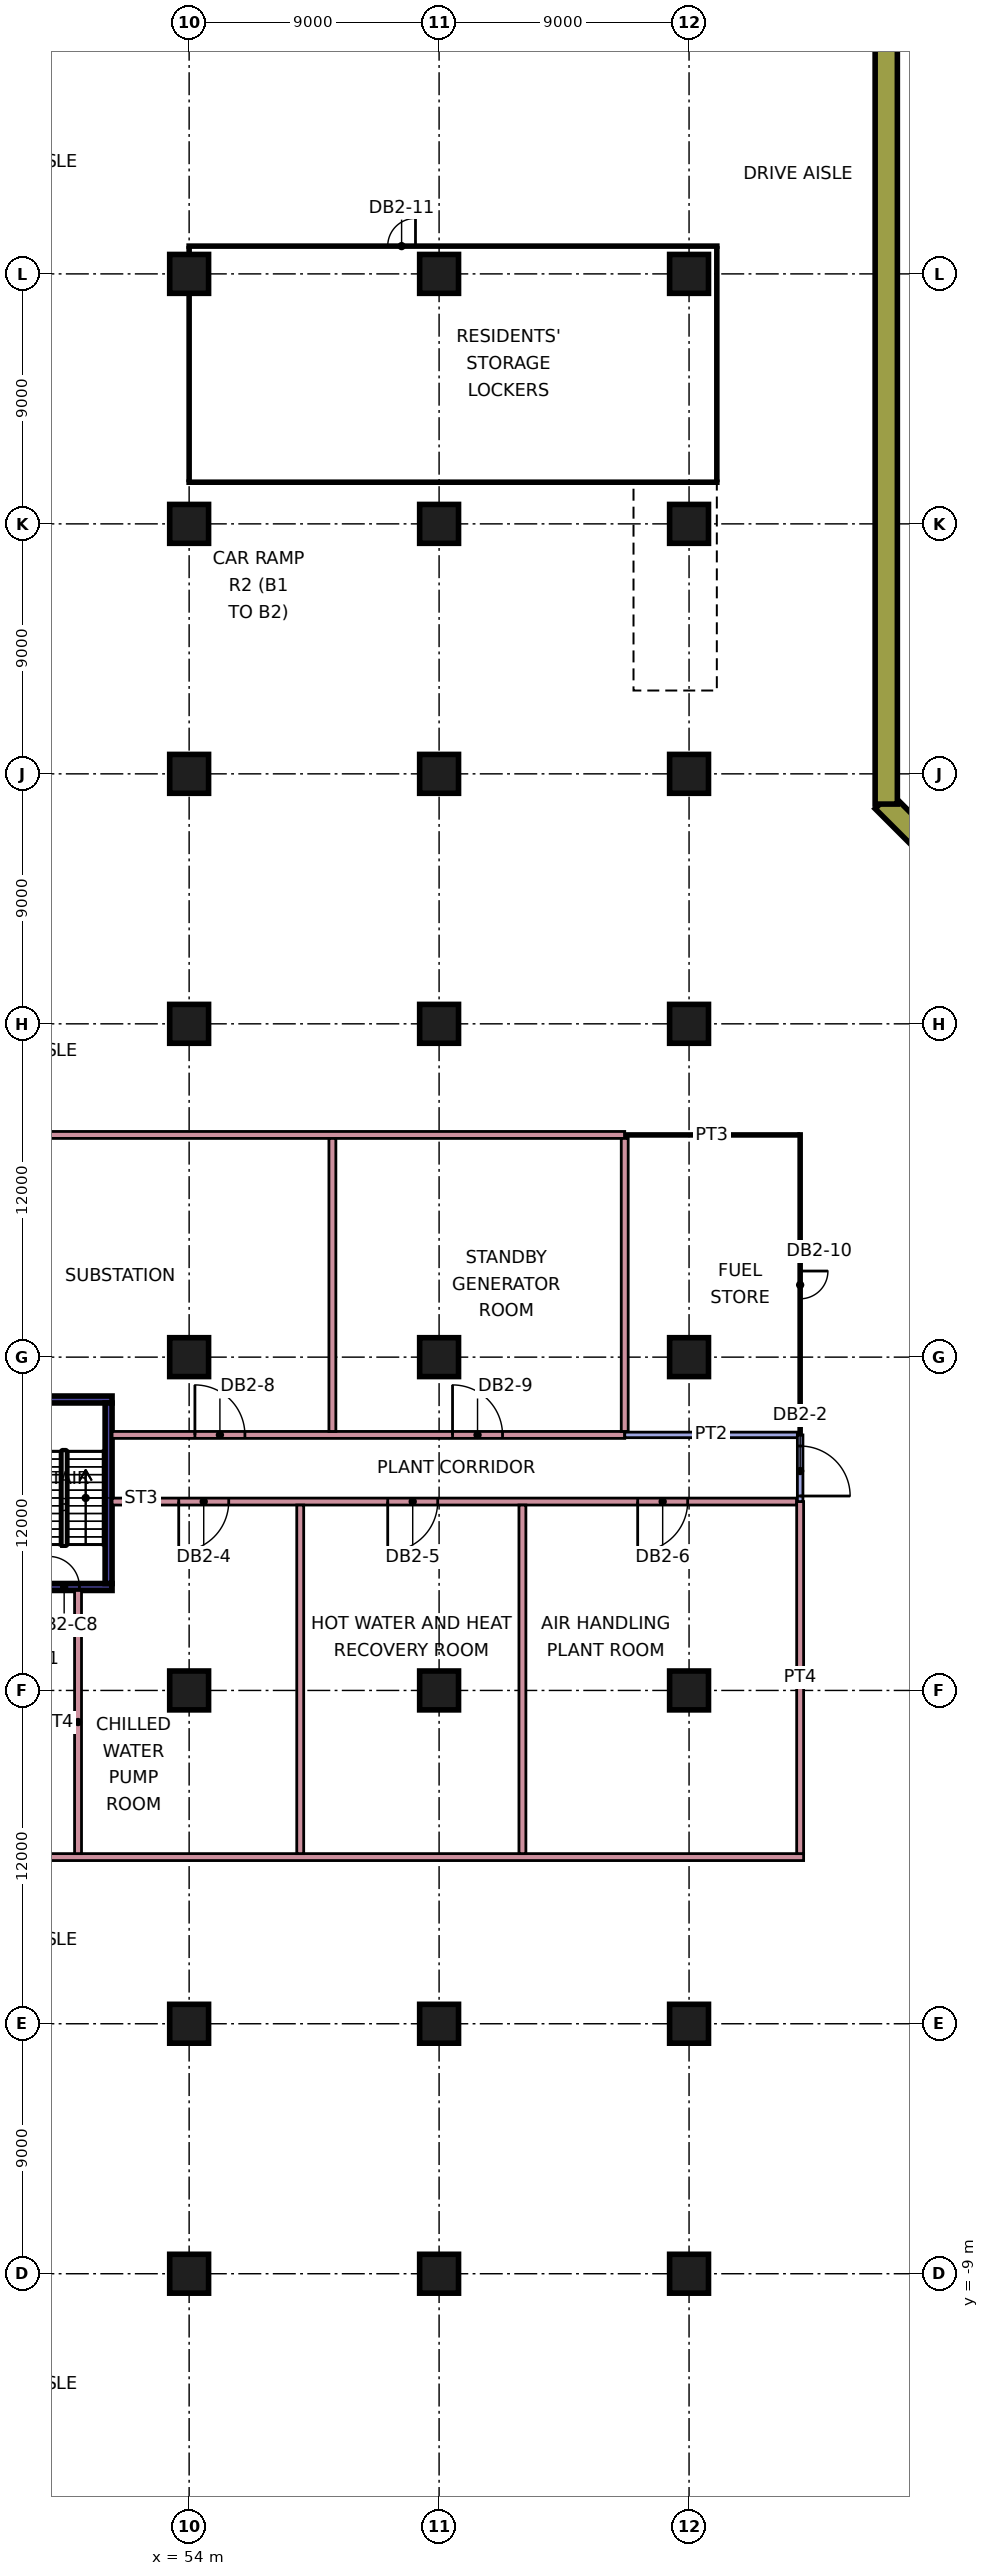
"""IFC4 building model, lengths in metres.
Left out: names, types, materials, properties, quantities, classifications, styles, units other than length and angle.
Written with IfcOpenShell. Run it as: python <this file> out.ifc"""

import sys

from ifc_helpers import new_model, si_unit, direction, frame, frame_2d, origin, origin_2d, place, context, subcontext, project, spatial, rectangle, extrude, element, fill, save


model = new_model("IFC4")
c1 = context("Model", 3, precision=1e-05, world=origin(), true_north=direction((0.0, 1.0)))
c2 = subcontext(c1, "Body", "Model", "MODEL_VIEW")
j1 = project(units=[si_unit("LENGTHUNIT", "METRE"), si_unit("PLANEANGLEUNIT", "RADIAN")], contexts=[c1])
p1 = place(None, origin())
s1 = spatial("IfcSite", under=j1, at=p1, CompositionType="ELEMENT")
p2 = place(p1, origin())
s2 = spatial("IfcBuilding", under=s1, at=p2, CompositionType="ELEMENT")
p3 = place(p2, frame((0.0, 0.0, -9.0)))
s3 = spatial("IfcBuildingStorey", under=s2, at=p3, CompositionType="ELEMENT", Elevation=-9.0)
for number, where, z_axis, x_axis in (
    (1, (54.0, -9.0, 0.0), (0.0, 0.0, 1.0), (1.0, 0.0, 0.0)),
    (2, (54.0, 0.0, 0.0), (0.0, 0.0, 1.0), (1.0, 0.0, 0.0)),
    (3, (54.0, 12.0, 0.0), (0.0, 0.0, 1.0), (1.0, 0.0, 0.0)),
    (4, (54.0, 24.0, 0.0), (0.0, 0.0, 1.0), (1.0, 0.0, 0.0)),
    (5, (54.0, 36.0, 0.0), (0.0, 0.0, 1.0), (1.0, 0.0, 0.0)),
    (6, (54.0, 45.0, 0.0), (0.0, 0.0, 1.0), (1.0, 0.0, 0.0)),
    (7, (54.0, 54.0, 0.0), (0.0, 0.0, 1.0), (1.0, 0.0, 0.0)),
    (8, (54.0, 63.0, 0.0), (0.0, 0.0, 1.0), (1.0, 0.0, 0.0)),
    (9, (63.0, -9.0, 0.0), (0.0, 0.0, 1.0), (1.0, 0.0, 0.0)),
    (10, (63.0, 0.0, 0.0), (0.0, 0.0, 1.0), (1.0, 0.0, 0.0)),
    (11, (63.0, 12.0, 0.0), (0.0, 0.0, 1.0), (1.0, 0.0, 0.0)),
    (12, (63.0, 24.0, 0.0), (0.0, 0.0, 1.0), (1.0, 0.0, 0.0)),
    (13, (63.0, 36.0, 0.0), (0.0, 0.0, 1.0), (1.0, 0.0, 0.0)),
    (14, (63.0, 45.0, 0.0), (0.0, 0.0, 1.0), (1.0, 0.0, 0.0)),
    (15, (63.0, 54.0, 0.0), (0.0, 0.0, 1.0), (1.0, 0.0, 0.0)),
    (16, (63.0, 63.0, 0.0), (0.0, 0.0, 1.0), (1.0, 0.0, 0.0)),
    (17, (72.0, -9.0, 0.0), (0.0, 0.0, 1.0), (1.0, 0.0, 0.0)),
    (18, (72.0, 0.0, 0.0), (0.0, 0.0, 1.0), (1.0, 0.0, 0.0)),
    (19, (72.0, 12.0, 0.0), (0.0, 0.0, 1.0), (1.0, 0.0, 0.0)),
    (20, (72.0, 24.0, 0.0), (0.0, 0.0, 1.0), (1.0, 0.0, 0.0)),
    (21, (72.0, 36.0, 0.0), (0.0, 0.0, 1.0), (1.0, 0.0, 0.0)),
    (22, (72.0, 45.0, 0.0), (0.0, 0.0, 1.0), (1.0, 0.0, 0.0)),
    (23, (72.0, 54.0, 0.0), (0.0, 0.0, 1.0), (1.0, 0.0, 0.0)),
    (24, (72.0, 63.0, 0.0), (0.0, 0.0, 1.0), (1.0, 0.0, 0.0)),
):
    element("IfcColumn", number, at=place(p3, frame(where, z_axis=z_axis, x_axis=x_axis)), inside=s3, PredefinedType="COLUMN", context=c2, shape_type="SweptSolid", body=[
        extrude(rectangle(XDim=1.4, YDim=1.4, at=origin_2d()), origin(), (0.0, 0.0, 1.0), 4.5),
    ])
p4 = place(p3, frame((47.775, 15.725, 0.0), z_axis=(0.0, 0.0, 1.0), x_axis=(1.0, 0.0, 0.0)))
e25 = element("IfcWall", 25, at=p4, inside=s3, PredefinedType="SHEAR", context=c2, shape_type="SweptSolid", body=[
    extrude(rectangle(XDim=3.45, YDim=0.25, at=frame_2d((1.725, 0.0))), origin(), (0.0, 0.0, 1.0), 4.5),
])
p5 = place(p4, frame((1.175, 0.0, 0.0)))
e26 = element("IfcOpeningElement", 26, at=p5, cuts=e25, PredefinedType="OPENING", context=c2, shape_type="SweptSolid", body=[
    extrude(rectangle(XDim=1.1, YDim=2.2, at=frame_2d((0.55, 1.1))), frame((0.0, 0.135, 0.0), z_axis=(0.0, -1.0, 0.0), x_axis=(1.0, 0.0, 0.0)), (0.0, 0.0, 1.0), 0.27),
])
p6 = place(p3, frame((47.775, 22.475, 0.0), z_axis=(0.0, 0.0, 1.0), x_axis=(1.0, 0.0, 0.0)))
e27 = element("IfcWall", 27, at=p6, inside=s3, PredefinedType="SHEAR", context=c2, shape_type="SweptSolid", body=[
    extrude(rectangle(XDim=3.45, YDim=0.25, at=frame_2d((1.725, 0.0))), origin(), (0.0, 0.0, 1.0), 4.5),
])
p7 = place(p3, frame((51.1, 15.85, 0.0), z_axis=(0.0, 0.0, 1.0), x_axis=(0.0, 1.0, 0.0)))
e28 = element("IfcWall", 28, at=p7, inside=s3, PredefinedType="SHEAR", context=c2, shape_type="SweptSolid", body=[
    extrude(rectangle(XDim=6.5, YDim=0.25, at=frame_2d((3.25, 0.0))), origin(), (0.0, 0.0, 1.0), 4.5),
])
p8 = place(p3, frame((78.294, -20.717, 0.0), z_axis=(0.0, 0.0, 1.0), x_axis=(0.707112814855, 0.707100747466, 0.0)))
e29 = element("IfcWall", 29, at=p8, inside=s3, PredefinedType="SOLIDWALL", context=c2, shape_type="SweptSolid", body=[
    extrude(rectangle(XDim=20.231, YDim=0.8, at=frame_2d((10.116, 0.0))), origin(), (0.0, 0.0, 1.0), 4.5),
])
p9 = place(p3, frame((92.717, 30.294, 0.0), z_axis=(0.0, 0.0, 1.0), x_axis=(-0.707106781187, 0.707106781187, 0.0)))
e30 = element("IfcWall", 30, at=p9, inside=s3, PredefinedType="SOLIDWALL", context=c2, shape_type="SweptSolid", body=[
    extrude(rectangle(XDim=19.423, YDim=0.8, at=frame_2d((9.712, 0.0))), origin(), (0.0, 0.0, 1.0), 4.5),
])
p10 = place(p3, frame((79.1, 43.912, 0.0), z_axis=(0.0, 0.0, 1.0), x_axis=(0.0, 1.0, 0.0)))
e31 = element("IfcWall", 31, at=p10, inside=s3, PredefinedType="SOLIDWALL", context=c2, shape_type="SweptSolid", body=[
    extrude(rectangle(XDim=35.188, YDim=0.8, at=frame_2d((17.594, 0.0))), origin(), (0.0, 0.0, 1.0), 4.5),
])
p11 = place(p3, frame((35.875, 32.0, 0.0), z_axis=(0.0, 0.0, 1.0), x_axis=(1.0, 0.0, 0.0)))
e32 = element("IfcWall", 32, at=p11, inside=s3, PredefinedType="PARTITIONING", context=c2, shape_type="SweptSolid", body=[
    extrude(rectangle(XDim=33.809, YDim=0.25, at=frame_2d((16.905, 0.0))), origin(), (0.0, 0.0, 1.0), 4.05),
])
p12 = place(p3, frame((40.65, 6.0, 0.0), z_axis=(0.0, 0.0, 1.0), x_axis=(1.0, 0.0, 0.0)))
e33 = element("IfcWall", 33, at=p12, inside=s3, PredefinedType="PARTITIONING", context=c2, shape_type="SweptSolid", body=[
    extrude(rectangle(XDim=35.475, YDim=0.25, at=frame_2d((17.738, 0.0))), origin(), (0.0, 0.0, 1.0), 4.05),
])
p13 = place(p3, frame((50.0, 6.125, 0.0), z_axis=(0.0, 0.0, 1.0), x_axis=(0.0, 1.0, 0.0)))
e34 = element("IfcWall", 34, at=p13, inside=s3, PredefinedType="PARTITIONING", context=c2, shape_type="SweptSolid", body=[
    extrude(rectangle(XDim=9.475, YDim=0.25, at=frame_2d((4.738, 0.0))), origin(), (0.0, 0.0, 1.0), 4.05),
])
p14 = place(p3, frame((51.225, 18.8, 0.0), z_axis=(0.0, 0.0, 1.0), x_axis=(1.0, 0.0, 0.0)))
e35 = element("IfcWall", 35, at=p14, inside=s3, PredefinedType="PARTITIONING", context=c2, shape_type="SweptSolid", body=[
    extrude(rectangle(XDim=24.65, YDim=0.25, at=frame_2d((12.325, 0.0))), origin(), (0.0, 0.0, 1.0), 4.05),
])
p15 = place(p14, frame((2.4, 0.0, 0.0)))
e36 = element("IfcOpeningElement", 36, at=p15, cuts=e35, PredefinedType="OPENING", context=c2, shape_type="SweptSolid", body=[
    extrude(rectangle(XDim=1.8, YDim=2.1, at=frame_2d((0.9, 1.05))), frame((0.0, 0.135, 0.0), z_axis=(0.0, -1.0, 0.0), x_axis=(1.0, 0.0, 0.0)), (0.0, 0.0, 1.0), 0.27),
])
p16 = place(p14, frame((9.925, 0.0, 0.0)))
e37 = element("IfcOpeningElement", 37, at=p16, cuts=e35, PredefinedType="OPENING", context=c2, shape_type="SweptSolid", body=[
    extrude(rectangle(XDim=1.8, YDim=2.1, at=frame_2d((0.9, 1.05))), frame((0.0, 0.135, 0.0), z_axis=(0.0, -1.0, 0.0), x_axis=(1.0, 0.0, 0.0)), (0.0, 0.0, 1.0), 0.27),
])
p17 = place(p14, frame((18.925, 0.0, 0.0)))
e38 = element("IfcOpeningElement", 38, at=p17, cuts=e35, PredefinedType="OPENING", context=c2, shape_type="SweptSolid", body=[
    extrude(rectangle(XDim=1.8, YDim=2.1, at=frame_2d((0.9, 1.05))), frame((0.0, 0.135, 0.0), z_axis=(0.0, -1.0, 0.0), x_axis=(1.0, 0.0, 0.0)), (0.0, 0.0, 1.0), 0.27),
])
p18 = place(p3, frame((51.225, 21.2, 0.0), z_axis=(0.0, 0.0, 1.0), x_axis=(1.0, 0.0, 0.0)))
e39 = element("IfcWall", 39, at=p18, inside=s3, PredefinedType="PARTITIONING", context=c2, shape_type="SweptSolid", body=[
    extrude(rectangle(XDim=18.459, YDim=0.25, at=frame_2d((9.229, 0.0))), origin(), (0.0, 0.0, 1.0), 4.05),
])
p19 = place(p18, frame((2.983, 0.0, 0.0)))
e40 = element("IfcOpeningElement", 40, at=p19, cuts=e39, PredefinedType="OPENING", context=c2, shape_type="SweptSolid", body=[
    extrude(rectangle(XDim=1.8, YDim=2.1, at=frame_2d((0.9, 1.05))), frame((0.0, 0.135, 0.0), z_axis=(0.0, -1.0, 0.0), x_axis=(1.0, 0.0, 0.0)), (0.0, 0.0, 1.0), 0.27),
])
p20 = place(p18, frame((12.259, 0.0, 0.0)))
e41 = element("IfcOpeningElement", 41, at=p20, cuts=e39, PredefinedType="OPENING", context=c2, shape_type="SweptSolid", body=[
    extrude(rectangle(XDim=1.8, YDim=2.1, at=frame_2d((0.9, 1.05))), frame((0.0, 0.135, 0.0), z_axis=(0.0, -1.0, 0.0), x_axis=(1.0, 0.0, 0.0)), (0.0, 0.0, 1.0), 0.27),
])
p21 = place(p3, frame((53.95, 55.5, 0.0), z_axis=(0.0, 0.0, 1.0), x_axis=(1.0, 0.0, 0.0)))
e42 = element("IfcWall", 42, at=p21, inside=s3, PredefinedType="PARTITIONING", context=c2, shape_type="SweptSolid", body=[
    extrude(rectangle(XDim=19.1, YDim=0.1, at=frame_2d((9.55, 0.0))), origin(), (0.0, 0.0, 1.0), 4.05),
])
p22 = place(p3, frame((53.95, 64.0, 0.0), z_axis=(0.0, 0.0, 1.0), x_axis=(1.0, 0.0, 0.0)))
e43 = element("IfcWall", 43, at=p22, inside=s3, PredefinedType="PARTITIONING", context=c2, shape_type="SweptSolid", body=[
    extrude(rectangle(XDim=19.1, YDim=0.1, at=frame_2d((9.55, 0.0))), origin(), (0.0, 0.0, 1.0), 4.05),
])
p23 = place(p22, frame((7.2, 0.0, 0.0)))
e44 = element("IfcOpeningElement", 44, at=p23, cuts=e43, PredefinedType="OPENING", context=c2, shape_type="SweptSolid", body=[
    extrude(rectangle(XDim=1.0, YDim=2.1, at=frame_2d((0.5, 1.05))), frame((0.0, 0.06, 0.0), z_axis=(0.0, -1.0, 0.0), x_axis=(1.0, 0.0, 0.0)), (0.0, 0.0, 1.0), 0.12),
])
p24 = place(p3, frame((54.0, 55.55, 0.0), z_axis=(0.0, 0.0, 1.0), x_axis=(0.0, 1.0, 0.0)))
e45 = element("IfcWall", 45, at=p24, inside=s3, PredefinedType="PARTITIONING", context=c2, shape_type="SweptSolid", body=[
    extrude(rectangle(XDim=6.751, YDim=0.1, at=frame_2d((3.375, 0.0))), origin(), (0.0, 0.0, 1.0), 4.05),
])
p25 = place(p3, frame((54.0, 63.699, 0.0), z_axis=(0.0, 0.0, 1.0), x_axis=(0.0, 1.0, 0.0)))
e46 = element("IfcWall", 46, at=p25, inside=s3, PredefinedType="PARTITIONING", context=c2, shape_type="SweptSolid", body=[
    extrude(rectangle(XDim=0.251, YDim=0.1, at=frame_2d((0.125, 0.0))), origin(), (0.0, 0.0, 1.0), 4.05),
])
p26 = place(p3, frame((58.0, 6.125, 0.0), z_axis=(0.0, 0.0, 1.0), x_axis=(0.0, 1.0, 0.0)))
e47 = element("IfcWall", 47, at=p26, inside=s3, PredefinedType="PARTITIONING", context=c2, shape_type="SweptSolid", body=[
    extrude(rectangle(XDim=12.55, YDim=0.25, at=frame_2d((6.275, 0.0))), origin(), (0.0, 0.0, 1.0), 4.05),
])
p27 = place(p3, frame((59.158, 21.325, 0.0), z_axis=(0.0, 0.0, 1.0), x_axis=(0.0, 1.0, 0.0)))
e48 = element("IfcWall", 48, at=p27, inside=s3, PredefinedType="PARTITIONING", context=c2, shape_type="SweptSolid", body=[
    extrude(rectangle(XDim=10.55, YDim=0.25, at=frame_2d((5.275, 0.0))), origin(), (0.0, 0.0, 1.0), 4.05),
])
p28 = place(p3, frame((66.0, 6.125, 0.0), z_axis=(0.0, 0.0, 1.0), x_axis=(0.0, 1.0, 0.0)))
e49 = element("IfcWall", 49, at=p28, inside=s3, PredefinedType="PARTITIONING", context=c2, shape_type="SweptSolid", body=[
    extrude(rectangle(XDim=12.55, YDim=0.25, at=frame_2d((6.275, 0.0))), origin(), (0.0, 0.0, 1.0), 4.05),
])
p29 = place(p3, frame((69.684, 21.2, 0.0), z_axis=(0.0, 0.0, 1.0), x_axis=(1.0, 0.0, 0.0)))
e50 = element("IfcWall", 50, at=p29, inside=s3, PredefinedType="PARTITIONING", context=c2, shape_type="SweptSolid", body=[
    extrude(rectangle(XDim=6.216, YDim=0.2, at=frame_2d((3.108, 0.0))), origin(), (0.0, 0.0, 1.0), 4.05),
])
p30 = place(p3, frame((69.684, 21.325, 0.0), z_axis=(0.0, 0.0, 1.0), x_axis=(0.0, 1.0, 0.0)))
e51 = element("IfcWall", 51, at=p30, inside=s3, PredefinedType="PARTITIONING", context=c2, shape_type="SweptSolid", body=[
    extrude(rectangle(XDim=10.55, YDim=0.25, at=frame_2d((5.275, 0.0))), origin(), (0.0, 0.0, 1.0), 4.05),
])
p31 = place(p3, frame((69.684, 32.0, 0.0), z_axis=(0.0, 0.0, 1.0), x_axis=(1.0, 0.0, 0.0)))
e52 = element("IfcWall", 52, at=p31, inside=s3, PredefinedType="PARTITIONING", context=c2, shape_type="SweptSolid", body=[
    extrude(rectangle(XDim=6.266, YDim=0.1, at=frame_2d((3.133, 0.0))), origin(), (0.0, 0.0, 1.0), 4.05),
])
p32 = place(p3, frame((73.0, 55.55, 0.0), z_axis=(0.0, 0.0, 1.0), x_axis=(0.0, 1.0, 0.0)))
e53 = element("IfcWall", 53, at=p32, inside=s3, PredefinedType="PARTITIONING", context=c2, shape_type="SweptSolid", body=[
    extrude(rectangle(XDim=8.4, YDim=0.1, at=frame_2d((4.2, 0.0))), origin(), (0.0, 0.0, 1.0), 4.05),
])
p33 = place(p3, frame((76.0, 6.125, 0.0), z_axis=(0.0, 0.0, 1.0), x_axis=(0.0, 1.0, 0.0)))
e54 = element("IfcWall", 54, at=p33, inside=s3, PredefinedType="PARTITIONING", context=c2, shape_type="SweptSolid", body=[
    extrude(rectangle(XDim=12.675, YDim=0.25, at=frame_2d((6.337, 0.0))), origin(), (0.0, 0.0, 1.0), 4.05),
])
p34 = place(p3, frame((76.0, 18.8, 0.0), z_axis=(0.0, 0.0, 1.0), x_axis=(0.0, 1.0, 0.0)))
e55 = element("IfcWall", 55, at=p34, inside=s3, PredefinedType="PARTITIONING", context=c2, shape_type="SweptSolid", body=[
    extrude(rectangle(XDim=2.4, YDim=0.2, at=frame_2d((1.2, 0.0))), origin(), (0.0, 0.0, 1.0), 4.05),
])
p35 = place(p34, frame((0.2, 0.0, 0.0)))
e56 = element("IfcOpeningElement", 56, at=p35, cuts=e55, PredefinedType="OPENING", context=c2, shape_type="SweptSolid", body=[
    extrude(rectangle(XDim=1.8, YDim=2.1, at=frame_2d((0.9, 1.05))), frame((0.0, 0.11, 0.0), z_axis=(0.0, -1.0, 0.0), x_axis=(1.0, 0.0, 0.0)), (0.0, 0.0, 1.0), 0.22),
])
p36 = place(p3, frame((76.0, 21.2, 0.0), z_axis=(0.0, 0.0, 1.0), x_axis=(0.0, 1.0, 0.0)))
e57 = element("IfcWall", 57, at=p36, inside=s3, PredefinedType="PARTITIONING", context=c2, shape_type="SweptSolid", body=[
    extrude(rectangle(XDim=10.85, YDim=0.1, at=frame_2d((5.425, 0.0))), origin(), (0.0, 0.0, 1.0), 4.05),
])
p37 = place(p36, frame((4.9, 0.0, 0.0)))
e58 = element("IfcOpeningElement", 58, at=p37, cuts=e57, PredefinedType="OPENING", context=c2, shape_type="SweptSolid", body=[
    extrude(rectangle(XDim=1.0, YDim=2.1, at=frame_2d((0.5, 1.05))), frame((0.0, 0.06, 0.0), z_axis=(0.0, -1.0, 0.0), x_axis=(1.0, 0.0, 0.0)), (0.0, 0.0, 1.0), 0.12),
])
p38 = place(p5, origin())
e59 = element("IfcDoor", 59, at=p38, inside=s3, OperationType="SINGLE_SWING_LEFT", PredefinedType="DOOR", context=c2, shape_type="SweptSolid", body=[
    extrude(rectangle(XDim=1.1, YDim=2.2, at=frame_2d((0.55, 1.1))), frame((0.0, 0.025, 0.0), z_axis=(0.0, -1.0, 0.0), x_axis=(1.0, 0.0, 0.0)), (0.0, 0.0, 1.0), 0.05),
])
fill(e26, e59)
p39 = place(p35, frame((1.8, 0.0, 0.0), z_axis=(0.0, 0.0, 1.0), x_axis=(-1.0, 0.0, 0.0)))
e60 = element("IfcDoor", 60, at=p39, inside=s3, OperationType="DOUBLE_DOOR_SINGLE_SWING", PredefinedType="DOOR", context=c2, shape_type="SweptSolid", body=[
    extrude(rectangle(XDim=1.8, YDim=2.1, at=frame_2d((0.9, 1.05))), frame((0.0, 0.025, 0.0), z_axis=(0.0, -1.0, 0.0), x_axis=(1.0, 0.0, 0.0)), (0.0, 0.0, 1.0), 0.05),
])
fill(e56, e60)
p40 = place(p15, frame((1.8, 0.0, 0.0), z_axis=(0.0, 0.0, 1.0), x_axis=(-1.0, 0.0, 0.0)))
e61 = element("IfcDoor", 61, at=p40, inside=s3, OperationType="DOUBLE_DOOR_SINGLE_SWING", PredefinedType="DOOR", context=c2, shape_type="SweptSolid", body=[
    extrude(rectangle(XDim=1.8, YDim=2.1, at=frame_2d((0.9, 1.05))), frame((0.0, 0.025, 0.0), z_axis=(0.0, -1.0, 0.0), x_axis=(1.0, 0.0, 0.0)), (0.0, 0.0, 1.0), 0.05),
])
fill(e36, e61)
p41 = place(p16, frame((1.8, 0.0, 0.0), z_axis=(0.0, 0.0, 1.0), x_axis=(-1.0, 0.0, 0.0)))
e62 = element("IfcDoor", 62, at=p41, inside=s3, OperationType="DOUBLE_DOOR_SINGLE_SWING", PredefinedType="DOOR", context=c2, shape_type="SweptSolid", body=[
    extrude(rectangle(XDim=1.8, YDim=2.1, at=frame_2d((0.9, 1.05))), frame((0.0, 0.025, 0.0), z_axis=(0.0, -1.0, 0.0), x_axis=(1.0, 0.0, 0.0)), (0.0, 0.0, 1.0), 0.05),
])
fill(e37, e62)
p42 = place(p17, frame((1.8, 0.0, 0.0), z_axis=(0.0, 0.0, 1.0), x_axis=(-1.0, 0.0, 0.0)))
e63 = element("IfcDoor", 63, at=p42, inside=s3, OperationType="DOUBLE_DOOR_SINGLE_SWING", PredefinedType="DOOR", context=c2, shape_type="SweptSolid", body=[
    extrude(rectangle(XDim=1.8, YDim=2.1, at=frame_2d((0.9, 1.05))), frame((0.0, 0.025, 0.0), z_axis=(0.0, -1.0, 0.0), x_axis=(1.0, 0.0, 0.0)), (0.0, 0.0, 1.0), 0.05),
])
fill(e38, e63)
p43 = place(p19, origin())
e64 = element("IfcDoor", 64, at=p43, inside=s3, OperationType="DOUBLE_DOOR_SINGLE_SWING", PredefinedType="DOOR", context=c2, shape_type="SweptSolid", body=[
    extrude(rectangle(XDim=1.8, YDim=2.1, at=frame_2d((0.9, 1.05))), frame((0.0, 0.025, 0.0), z_axis=(0.0, -1.0, 0.0), x_axis=(1.0, 0.0, 0.0)), (0.0, 0.0, 1.0), 0.05),
])
fill(e40, e64)
p44 = place(p20, origin())
e65 = element("IfcDoor", 65, at=p44, inside=s3, OperationType="DOUBLE_DOOR_SINGLE_SWING", PredefinedType="DOOR", context=c2, shape_type="SweptSolid", body=[
    extrude(rectangle(XDim=1.8, YDim=2.1, at=frame_2d((0.9, 1.05))), frame((0.0, 0.025, 0.0), z_axis=(0.0, -1.0, 0.0), x_axis=(1.0, 0.0, 0.0)), (0.0, 0.0, 1.0), 0.05),
])
fill(e41, e65)
p45 = place(p37, origin())
e66 = element("IfcDoor", 66, at=p45, inside=s3, OperationType="SINGLE_SWING_RIGHT", PredefinedType="DOOR", context=c2, shape_type="SweptSolid", body=[
    extrude(rectangle(XDim=1.0, YDim=2.1, at=frame_2d((0.5, 1.05))), frame((0.0, 0.025, 0.0), z_axis=(0.0, -1.0, 0.0), x_axis=(1.0, 0.0, 0.0)), (0.0, 0.0, 1.0), 0.05),
])
fill(e58, e66)
p46 = place(p23, frame((1.0, 0.0, 0.0), z_axis=(0.0, 0.0, 1.0), x_axis=(-1.0, 0.0, 0.0)))
e67 = element("IfcDoor", 67, at=p46, inside=s3, OperationType="SINGLE_SWING_RIGHT", PredefinedType="DOOR", context=c2, shape_type="SweptSolid", body=[
    extrude(rectangle(XDim=1.0, YDim=2.1, at=frame_2d((0.5, 1.05))), frame((0.0, 0.025, 0.0), z_axis=(0.0, -1.0, 0.0), x_axis=(1.0, 0.0, 0.0)), (0.0, 0.0, 1.0), 0.05),
])
fill(e44, e67)
save(model, sys.argv[1])
